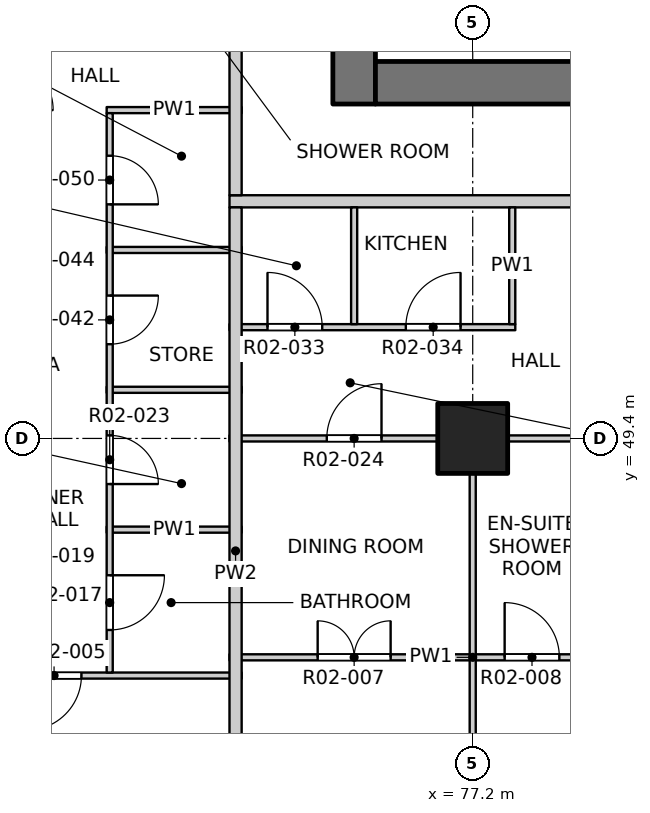
"""IFC4 building model, lengths in metres.
Left out: names, types, materials, properties, quantities, classifications, styles, units other than length and angle.
Written with IfcOpenShell. Run it as: python <this file> out.ifc"""

import sys

from ifc_helpers import new_model, si_unit, direction, frame, frame_2d, origin, origin_2d, place, context, subcontext, project, spatial, rectangle, extrude, element, fill, save


model = new_model("IFC4")
c1 = context("Model", 3, precision=1e-05, world=origin(), true_north=direction((0.0, 1.0)))
c2 = subcontext(c1, "Body", "Model", "MODEL_VIEW")
j1 = project(units=[si_unit("LENGTHUNIT", "METRE"), si_unit("PLANEANGLEUNIT", "RADIAN")], contexts=[c1])
p1 = place(None, origin())
s1 = spatial("IfcSite", under=j1, at=p1, CompositionType="ELEMENT")
p2 = place(p1, origin())
s2 = spatial("IfcBuilding", under=s1, at=p2, CompositionType="ELEMENT")
p3 = place(p2, frame((0.0, 0.0, 36.5)))
s3 = spatial("IfcBuildingStorey", under=s2, at=p3, CompositionType="ELEMENT", Elevation=36.5)
p4 = place(p3, frame((77.2, 49.4, -0.25), z_axis=(0.0, 0.0, 1.0), x_axis=(1.0, 0.0, 0.0)))
e1 = element("IfcColumn", 1, at=p4, inside=s3, PredefinedType="COLUMN", context=c2, shape_type="SweptSolid", body=[
    extrude(rectangle(XDim=1.15, YDim=1.15, at=origin_2d()), origin(), (0.0, 0.0, 1.0), 3.4),
])
p5 = place(p3, frame((75.25, 54.9, -0.25), z_axis=(0.0, 0.0, 1.0), x_axis=(0.0, 1.0, 0.0)))
e2 = element("IfcWall", 2, at=p5, inside=s3, PredefinedType="SOLIDWALL", context=c2, shape_type="SweptSolid", body=[
    extrude(rectangle(XDim=22.4, YDim=0.7, at=frame_2d((11.2, 0.0))), origin(), (0.0, 0.0, 1.0), 3.4),
])
p6 = place(p5, frame((7.55, 0.0, 0.25)))
e3 = element("IfcOpeningElement", 3, at=p6, cuts=e2, PredefinedType="OPENING", context=c2, shape_type="SweptSolid", body=[
    extrude(rectangle(XDim=0.9, YDim=2.1, at=frame_2d((0.45, 1.05))), frame((0.0, 0.36, 0.0), z_axis=(0.0, -1.0, 0.0), x_axis=(1.0, 0.0, 0.0)), (0.0, 0.0, 1.0), 0.72),
])
p7 = place(p5, frame((10.85, 0.0, 0.25)))
e4 = element("IfcOpeningElement", 4, at=p7, cuts=e2, PredefinedType="OPENING", context=c2, shape_type="SweptSolid", body=[
    extrude(rectangle(XDim=0.9, YDim=2.1, at=frame_2d((0.45, 1.05))), frame((0.0, 0.36, 0.0), z_axis=(0.0, -1.0, 0.0), x_axis=(1.0, 0.0, 0.0)), (0.0, 0.0, 1.0), 0.72),
])
p8 = place(p5, frame((13.85, 0.0, 0.25)))
e5 = element("IfcOpeningElement", 5, at=p8, cuts=e2, PredefinedType="OPENING", context=c2, shape_type="SweptSolid", body=[
    extrude(rectangle(XDim=0.9, YDim=2.1, at=frame_2d((0.45, 1.05))), frame((0.0, 0.36, 0.0), z_axis=(0.0, -1.0, 0.0), x_axis=(1.0, 0.0, 0.0)), (0.0, 0.0, 1.0), 0.72),
])
p9 = place(p5, frame((16.85, 0.0, 0.25)))
e6 = element("IfcOpeningElement", 6, at=p9, cuts=e2, PredefinedType="OPENING", context=c2, shape_type="SweptSolid", body=[
    extrude(rectangle(XDim=0.9, YDim=2.1, at=frame_2d((0.45, 1.05))), frame((0.0, 0.36, 0.0), z_axis=(0.0, -1.0, 0.0), x_axis=(1.0, 0.0, 0.0)), (0.0, 0.0, 1.0), 0.72),
])
p10 = place(p5, frame((20.15, 0.0, 0.25)))
e7 = element("IfcOpeningElement", 7, at=p10, cuts=e2, PredefinedType="OPENING", context=c2, shape_type="SweptSolid", body=[
    extrude(rectangle(XDim=0.9, YDim=2.1, at=frame_2d((0.45, 1.05))), frame((0.0, 0.36, 0.0), z_axis=(0.0, -1.0, 0.0), x_axis=(1.0, 0.0, 0.0)), (0.0, 0.0, 1.0), 0.72),
])
p11 = place(p3, frame((75.6, 55.25, -0.25), z_axis=(0.0, 0.0, 1.0), x_axis=(1.0, 0.0, 0.0)))
e8 = element("IfcWall", 8, at=p11, inside=s3, PredefinedType="SOLIDWALL", context=c2, shape_type="SweptSolid", body=[
    extrude(rectangle(XDim=18.8, YDim=0.7, at=frame_2d((9.4, 0.0))), origin(), (0.0, 0.0, 1.0), 3.4),
])
p12 = place(p11, frame((8.65, 0.0, 0.25)))
e9 = element("IfcOpeningElement", 9, at=p12, cuts=e8, PredefinedType="OPENING", context=c2, shape_type="SweptSolid", body=[
    extrude(rectangle(XDim=1.5, YDim=2.1, at=frame_2d((0.75, 1.05))), frame((0.0, 0.36, 0.0), z_axis=(0.0, -1.0, 0.0), x_axis=(1.0, 0.0, 0.0)), (0.0, 0.0, 1.0), 0.72),
])
p13 = place(p3, frame((61.9, 45.5, 0.0), z_axis=(0.0, 0.0, 1.0), x_axis=(1.0, 0.0, 0.0)))
e10 = element("IfcWall", 10, at=p13, inside=s3, PredefinedType="PARTITIONING", context=c2, shape_type="SweptSolid", body=[
    extrude(rectangle(XDim=11.5, YDim=0.1, at=frame_2d((5.75, 0.0))), origin(), (0.0, 0.0, 1.0), 3.15),
])
p14 = place(p13, frame((7.965, 0.0, 0.0)))
e11 = element("IfcOpeningElement", 11, at=p14, cuts=e10, PredefinedType="OPENING", context=c2, shape_type="SweptSolid", body=[
    extrude(rectangle(XDim=0.9, YDim=2.1, at=frame_2d((0.45, 1.05))), frame((0.0, 0.06, 0.0), z_axis=(0.0, -1.0, 0.0), x_axis=(1.0, 0.0, 0.0)), (0.0, 0.0, 1.0), 0.12),
])
p15 = place(p3, frame((73.2, 45.8, 0.0), z_axis=(0.0, 0.0, 1.0), x_axis=(1.0, 0.0, 0.0)))
e12 = element("IfcWall", 12, at=p15, inside=s3, PredefinedType="PARTITIONING", context=c2, shape_type="SweptSolid", body=[
    extrude(rectangle(XDim=8.0, YDim=0.1, at=frame_2d((4.0, 0.0))), origin(), (0.0, 0.0, 1.0), 3.15),
])
p16 = place(p15, frame((1.45, 0.0, 0.0)))
e13 = element("IfcOpeningElement", 13, at=p16, cuts=e12, PredefinedType="OPENING", context=c2, shape_type="SweptSolid", body=[
    extrude(rectangle(XDim=1.2, YDim=2.1, at=frame_2d((0.6, 1.05))), frame((0.0, 0.06, 0.0), z_axis=(0.0, -1.0, 0.0), x_axis=(1.0, 0.0, 0.0)), (0.0, 0.0, 1.0), 0.12),
])
p17 = place(p15, frame((4.525, 0.0, 0.0)))
e14 = element("IfcOpeningElement", 14, at=p17, cuts=e12, PredefinedType="OPENING", context=c2, shape_type="SweptSolid", body=[
    extrude(rectangle(XDim=0.9, YDim=2.1, at=frame_2d((0.45, 1.05))), frame((0.0, 0.06, 0.0), z_axis=(0.0, -1.0, 0.0), x_axis=(1.0, 0.0, 0.0)), (0.0, 0.0, 1.0), 0.12),
])
p18 = place(p15, frame((6.475, 0.0, 0.0)))
e15 = element("IfcOpeningElement", 15, at=p18, cuts=e12, PredefinedType="OPENING", context=c2, shape_type="SweptSolid", body=[
    extrude(rectangle(XDim=0.9, YDim=2.1, at=frame_2d((0.45, 1.05))), frame((0.0, 0.06, 0.0), z_axis=(0.0, -1.0, 0.0), x_axis=(1.0, 0.0, 0.0)), (0.0, 0.0, 1.0), 0.12),
])
p19 = place(p3, frame((71.18, 47.9, 0.0), z_axis=(0.0, 0.0, 1.0), x_axis=(1.0, 0.0, 0.0)))
e16 = element("IfcWall", 16, at=p19, inside=s3, PredefinedType="PARTITIONING", context=c2, shape_type="SweptSolid", body=[
    extrude(rectangle(XDim=2.22, YDim=0.1, at=frame_2d((1.11, 0.0))), origin(), (0.0, 0.0, 1.0), 3.15),
])
p20 = place(p3, frame((73.2, 49.4, 0.0), z_axis=(0.0, 0.0, 1.0), x_axis=(1.0, 0.0, 0.0)))
e17 = element("IfcWall", 17, at=p20, inside=s3, PredefinedType="PARTITIONING", context=c2, shape_type="SweptSolid", body=[
    extrude(rectangle(XDim=23.6, YDim=0.1, at=frame_2d((11.8, 0.0))), origin(), (0.0, 0.0, 1.0), 3.15),
])
p21 = place(p20, frame((1.6, 0.0, 0.0)))
e18 = element("IfcOpeningElement", 18, at=p21, cuts=e17, PredefinedType="OPENING", context=c2, shape_type="SweptSolid", body=[
    extrude(rectangle(XDim=0.9, YDim=2.1, at=frame_2d((0.45, 1.05))), frame((0.0, 0.06, 0.0), z_axis=(0.0, -1.0, 0.0), x_axis=(1.0, 0.0, 0.0)), (0.0, 0.0, 1.0), 0.12),
])
p22 = place(p20, frame((6.475, 0.0, 0.0)))
e19 = element("IfcOpeningElement", 19, at=p22, cuts=e17, PredefinedType="OPENING", context=c2, shape_type="SweptSolid", body=[
    extrude(rectangle(XDim=0.9, YDim=2.1, at=frame_2d((0.45, 1.05))), frame((0.0, 0.06, 0.0), z_axis=(0.0, -1.0, 0.0), x_axis=(1.0, 0.0, 0.0)), (0.0, 0.0, 1.0), 0.12),
])
p23 = place(p20, frame((10.2, 0.0, 0.0)))
e20 = element("IfcOpeningElement", 20, at=p23, cuts=e17, PredefinedType="OPENING", context=c2, shape_type="SweptSolid", body=[
    extrude(rectangle(XDim=0.9, YDim=2.1, at=frame_2d((0.45, 1.05))), frame((0.0, 0.06, 0.0), z_axis=(0.0, -1.0, 0.0), x_axis=(1.0, 0.0, 0.0)), (0.0, 0.0, 1.0), 0.12),
])
p24 = place(p20, frame((13.3, 0.0, 0.0)))
e21 = element("IfcOpeningElement", 21, at=p24, cuts=e17, PredefinedType="OPENING", context=c2, shape_type="SweptSolid", body=[
    extrude(rectangle(XDim=0.9, YDim=2.1, at=frame_2d((0.45, 1.05))), frame((0.0, 0.06, 0.0), z_axis=(0.0, -1.0, 0.0), x_axis=(1.0, 0.0, 0.0)), (0.0, 0.0, 1.0), 0.12),
])
p25 = place(p20, frame((18.0, 0.0, 0.0)))
e22 = element("IfcOpeningElement", 22, at=p25, cuts=e17, PredefinedType="OPENING", context=c2, shape_type="SweptSolid", body=[
    extrude(rectangle(XDim=0.9, YDim=2.1, at=frame_2d((0.45, 1.05))), frame((0.0, 0.06, 0.0), z_axis=(0.0, -1.0, 0.0), x_axis=(1.0, 0.0, 0.0)), (0.0, 0.0, 1.0), 0.12),
])
p26 = place(p20, frame((21.1, 0.0, 0.0)))
e23 = element("IfcOpeningElement", 23, at=p26, cuts=e17, PredefinedType="OPENING", context=c2, shape_type="SweptSolid", body=[
    extrude(rectangle(XDim=0.9, YDim=2.1, at=frame_2d((0.45, 1.05))), frame((0.0, 0.06, 0.0), z_axis=(0.0, -1.0, 0.0), x_axis=(1.0, 0.0, 0.0)), (0.0, 0.0, 1.0), 0.12),
])
p27 = place(p3, frame((71.18, 50.2, 0.0), z_axis=(0.0, 0.0, 1.0), x_axis=(1.0, 0.0, 0.0)))
e24 = element("IfcWall", 24, at=p27, inside=s3, PredefinedType="PARTITIONING", context=c2, shape_type="SweptSolid", body=[
    extrude(rectangle(XDim=2.22, YDim=0.1, at=frame_2d((1.11, 0.0))), origin(), (0.0, 0.0, 1.0), 3.15),
])
p28 = place(p3, frame((73.2, 51.23, 0.0), z_axis=(0.0, 0.0, 1.0), x_axis=(1.0, 0.0, 0.0)))
e25 = element("IfcWall", 25, at=p28, inside=s3, PredefinedType="PARTITIONING", context=c2, shape_type="SweptSolid", body=[
    extrude(rectangle(XDim=4.7, YDim=0.1, at=frame_2d((2.35, 0.0))), origin(), (0.0, 0.0, 1.0), 3.15),
])
p29 = place(p28, frame((0.625, 0.0, 0.0)))
e26 = element("IfcOpeningElement", 26, at=p29, cuts=e25, PredefinedType="OPENING", context=c2, shape_type="SweptSolid", body=[
    extrude(rectangle(XDim=0.9, YDim=2.1, at=frame_2d((0.45, 1.05))), frame((0.0, 0.06, 0.0), z_axis=(0.0, -1.0, 0.0), x_axis=(1.0, 0.0, 0.0)), (0.0, 0.0, 1.0), 0.12),
])
p30 = place(p28, frame((2.9, 0.0, 0.0)))
e27 = element("IfcOpeningElement", 27, at=p30, cuts=e25, PredefinedType="OPENING", context=c2, shape_type="SweptSolid", body=[
    extrude(rectangle(XDim=0.9, YDim=2.1, at=frame_2d((0.45, 1.05))), frame((0.0, 0.06, 0.0), z_axis=(0.0, -1.0, 0.0), x_axis=(1.0, 0.0, 0.0)), (0.0, 0.0, 1.0), 0.12),
])
p31 = place(p3, frame((71.18, 52.5, 0.0), z_axis=(0.0, 0.0, 1.0), x_axis=(1.0, 0.0, 0.0)))
e28 = element("IfcWall", 28, at=p31, inside=s3, PredefinedType="PARTITIONING", context=c2, shape_type="SweptSolid", body=[
    extrude(rectangle(XDim=2.22, YDim=0.1, at=frame_2d((1.11, 0.0))), origin(), (0.0, 0.0, 1.0), 3.15),
])
p32 = place(p3, frame((73.2, 53.3, 0.0), z_axis=(0.0, 0.0, 1.0), x_axis=(1.0, 0.0, 0.0)))
e29 = element("IfcWall", 29, at=p32, inside=s3, PredefinedType="PARTITIONING", context=c2, shape_type="SweptSolid", body=[
    extrude(rectangle(XDim=23.6, YDim=0.2, at=frame_2d((11.8, 0.0))), origin(), (0.0, 0.0, 1.0), 3.15),
])
p33 = place(p32, frame((5.925, 0.0, 0.0)))
e30 = element("IfcOpeningElement", 30, at=p33, cuts=e29, PredefinedType="OPENING", context=c2, shape_type="SweptSolid", body=[
    extrude(rectangle(XDim=1.0, YDim=2.1, at=frame_2d((0.5, 1.05))), frame((0.0, 0.11, 0.0), z_axis=(0.0, -1.0, 0.0), x_axis=(1.0, 0.0, 0.0)), (0.0, 0.0, 1.0), 0.22),
])
p34 = place(p32, frame((17.925, 0.0, 0.0)))
e31 = element("IfcOpeningElement", 31, at=p34, cuts=e29, PredefinedType="OPENING", context=c2, shape_type="SweptSolid", body=[
    extrude(rectangle(XDim=1.0, YDim=2.1, at=frame_2d((0.5, 1.05))), frame((0.0, 0.11, 0.0), z_axis=(0.0, -1.0, 0.0), x_axis=(1.0, 0.0, 0.0)), (0.0, 0.0, 1.0), 0.22),
])
p35 = place(p3, frame((71.18, 54.8, 0.0), z_axis=(0.0, 0.0, 1.0), x_axis=(1.0, 0.0, 0.0)))
e32 = element("IfcWall", 32, at=p35, inside=s3, PredefinedType="PARTITIONING", context=c2, shape_type="SweptSolid", body=[
    extrude(rectangle(XDim=2.22, YDim=0.1, at=frame_2d((1.11, 0.0))), origin(), (0.0, 0.0, 1.0), 3.15),
])
p36 = place(p3, frame((71.23, 45.55, 0.0), z_axis=(0.0, 0.0, 1.0), x_axis=(0.0, 1.0, 0.0)))
e33 = element("IfcWall", 33, at=p36, inside=s3, PredefinedType="PARTITIONING", context=c2, shape_type="SweptSolid", body=[
    extrude(rectangle(XDim=9.2, YDim=0.1, at=frame_2d((4.6, 0.0))), origin(), (0.0, 0.0, 1.0), 3.15),
])
p37 = place(p36, frame((0.7, 0.0, 0.0)))
e34 = element("IfcOpeningElement", 34, at=p37, cuts=e33, PredefinedType="OPENING", context=c2, shape_type="SweptSolid", body=[
    extrude(rectangle(XDim=0.9, YDim=2.1, at=frame_2d((0.45, 1.05))), frame((0.0, 0.06, 0.0), z_axis=(0.0, -1.0, 0.0), x_axis=(1.0, 0.0, 0.0)), (0.0, 0.0, 1.0), 0.12),
])
p38 = place(p36, frame((3.1, 0.0, 0.0)))
e35 = element("IfcOpeningElement", 35, at=p38, cuts=e33, PredefinedType="OPENING", context=c2, shape_type="SweptSolid", body=[
    extrude(rectangle(XDim=0.8, YDim=2.1, at=frame_2d((0.4, 1.05))), frame((0.0, 0.06, 0.0), z_axis=(0.0, -1.0, 0.0), x_axis=(1.0, 0.0, 0.0)), (0.0, 0.0, 1.0), 0.12),
])
p39 = place(p36, frame((5.4, 0.0, 0.0)))
e36 = element("IfcOpeningElement", 36, at=p39, cuts=e33, PredefinedType="OPENING", context=c2, shape_type="SweptSolid", body=[
    extrude(rectangle(XDim=0.8, YDim=2.1, at=frame_2d((0.4, 1.05))), frame((0.0, 0.06, 0.0), z_axis=(0.0, -1.0, 0.0), x_axis=(1.0, 0.0, 0.0)), (0.0, 0.0, 1.0), 0.12),
])
p40 = place(p36, frame((7.7, 0.0, 0.0)))
e37 = element("IfcOpeningElement", 37, at=p40, cuts=e33, PredefinedType="OPENING", context=c2, shape_type="SweptSolid", body=[
    extrude(rectangle(XDim=0.8, YDim=2.1, at=frame_2d((0.4, 1.05))), frame((0.0, 0.06, 0.0), z_axis=(0.0, -1.0, 0.0), x_axis=(1.0, 0.0, 0.0)), (0.0, 0.0, 1.0), 0.12),
])
p41 = place(p3, frame((73.3, 41.9, 0.0), z_axis=(0.0, 0.0, 1.0), x_axis=(0.0, 1.0, 0.0)))
e38 = element("IfcWall", 38, at=p41, inside=s3, PredefinedType="PARTITIONING", context=c2, shape_type="SweptSolid", body=[
    extrude(rectangle(XDim=11.3, YDim=0.2, at=frame_2d((5.65, 0.0))), origin(), (0.0, 0.0, 1.0), 3.15),
])
p42 = place(p3, frame((73.3, 53.4, 0.0), z_axis=(0.0, 0.0, 1.0), x_axis=(0.0, 1.0, 0.0)))
e39 = element("IfcWall", 39, at=p42, inside=s3, PredefinedType="PARTITIONING", context=c2, shape_type="SweptSolid", body=[
    extrude(rectangle(XDim=31.0, YDim=0.2, at=frame_2d((15.5, 0.0))), origin(), (0.0, 0.0, 1.0), 3.15),
])
p43 = place(p42, frame((2.675, 0.0, 0.0)))
e40 = element("IfcOpeningElement", 40, at=p43, cuts=e39, PredefinedType="OPENING", context=c2, shape_type="SweptSolid", body=[
    extrude(rectangle(XDim=1.0, YDim=2.1, at=frame_2d((0.5, 1.05))), frame((0.0, 0.11, 0.0), z_axis=(0.0, -1.0, 0.0), x_axis=(1.0, 0.0, 0.0)), (0.0, 0.0, 1.0), 0.22),
])
p44 = place(p42, frame((18.125, 0.0, 0.0)))
e41 = element("IfcOpeningElement", 41, at=p44, cuts=e39, PredefinedType="OPENING", context=c2, shape_type="SweptSolid", body=[
    extrude(rectangle(XDim=1.0, YDim=2.1, at=frame_2d((0.5, 1.05))), frame((0.0, 0.11, 0.0), z_axis=(0.0, -1.0, 0.0), x_axis=(1.0, 0.0, 0.0)), (0.0, 0.0, 1.0), 0.22),
])
p45 = place(p42, frame((26.025, 0.0, 0.0)))
e42 = element("IfcOpeningElement", 42, at=p45, cuts=e39, PredefinedType="OPENING", context=c2, shape_type="SweptSolid", body=[
    extrude(rectangle(XDim=1.0, YDim=2.1, at=frame_2d((0.5, 1.05))), frame((0.0, 0.11, 0.0), z_axis=(0.0, -1.0, 0.0), x_axis=(1.0, 0.0, 0.0)), (0.0, 0.0, 1.0), 0.22),
])
p46 = place(p3, frame((75.25, 51.28, 0.0), z_axis=(0.0, 0.0, 1.0), x_axis=(0.0, 1.0, 0.0)))
e43 = element("IfcWall", 43, at=p46, inside=s3, PredefinedType="PARTITIONING", context=c2, shape_type="SweptSolid", body=[
    extrude(rectangle(XDim=1.92, YDim=0.1, at=frame_2d((0.96, 0.0))), origin(), (0.0, 0.0, 1.0), 3.15),
])
p47 = place(p3, frame((77.2, 41.9, 0.0), z_axis=(0.0, 0.0, 1.0), x_axis=(0.0, 1.0, 0.0)))
e44 = element("IfcWall", 44, at=p47, inside=s3, PredefinedType="PARTITIONING", context=c2, shape_type="SweptSolid", body=[
    extrude(rectangle(XDim=7.45, YDim=0.1, at=frame_2d((3.725, 0.0))), origin(), (0.0, 0.0, 1.0), 2.55),
])
p48 = place(p3, frame((77.85, 51.28, 0.0), z_axis=(0.0, 0.0, 1.0), x_axis=(0.0, 1.0, 0.0)))
e45 = element("IfcWall", 45, at=p48, inside=s3, PredefinedType="PARTITIONING", context=c2, shape_type="SweptSolid", body=[
    extrude(rectangle(XDim=1.92, YDim=0.1, at=frame_2d((0.96, 0.0))), origin(), (0.0, 0.0, 1.0), 3.15),
])
p49 = place(p14, origin())
e46 = element("IfcDoor", 46, at=p49, inside=s3, OperationType="SINGLE_SWING_RIGHT", PredefinedType="DOOR", context=c2, shape_type="SweptSolid", body=[
    extrude(rectangle(XDim=0.9, YDim=2.1, at=frame_2d((0.45, 1.05))), frame((0.0, 0.025, 0.0), z_axis=(0.0, -1.0, 0.0), x_axis=(1.0, 0.0, 0.0)), (0.0, 0.0, 1.0), 0.05),
])
fill(e11, e46)
p50 = place(p16, origin())
e47 = element("IfcDoor", 47, at=p50, inside=s3, OperationType="DOUBLE_DOOR_SINGLE_SWING", PredefinedType="DOOR", context=c2, shape_type="SweptSolid", body=[
    extrude(rectangle(XDim=1.2, YDim=2.1, at=frame_2d((0.6, 1.05))), frame((0.0, 0.025, 0.0), z_axis=(0.0, -1.0, 0.0), x_axis=(1.0, 0.0, 0.0)), (0.0, 0.0, 1.0), 0.05),
])
fill(e13, e47)
p51 = place(p17, origin())
e48 = element("IfcDoor", 48, at=p51, inside=s3, OperationType="SINGLE_SWING_LEFT", PredefinedType="DOOR", context=c2, shape_type="SweptSolid", body=[
    extrude(rectangle(XDim=0.9, YDim=2.1, at=frame_2d((0.45, 1.05))), frame((0.0, 0.025, 0.0), z_axis=(0.0, -1.0, 0.0), x_axis=(1.0, 0.0, 0.0)), (0.0, 0.0, 1.0), 0.05),
])
fill(e14, e48)
p52 = place(p37, origin())
e49 = element("IfcDoor", 49, at=p52, inside=s3, OperationType="SINGLE_SWING_LEFT", PredefinedType="DOOR", context=c2, shape_type="SweptSolid", body=[
    extrude(rectangle(XDim=0.9, YDim=2.1, at=frame_2d((0.45, 1.05))), frame((0.0, 0.025, 0.0), z_axis=(0.0, -1.0, 0.0), x_axis=(1.0, 0.0, 0.0)), (0.0, 0.0, 1.0), 0.05),
])
fill(e34, e49)
p53 = place(p38, origin())
e50 = element("IfcDoor", 50, at=p53, inside=s3, OperationType="SINGLE_SWING_RIGHT", PredefinedType="DOOR", context=c2, shape_type="SweptSolid", body=[
    extrude(rectangle(XDim=0.8, YDim=2.1, at=frame_2d((0.4, 1.05))), frame((0.0, 0.025, 0.0), z_axis=(0.0, -1.0, 0.0), x_axis=(1.0, 0.0, 0.0)), (0.0, 0.0, 1.0), 0.05),
])
fill(e35, e50)
p54 = place(p21, origin())
e51 = element("IfcDoor", 51, at=p54, inside=s3, OperationType="SINGLE_SWING_RIGHT", PredefinedType="DOOR", context=c2, shape_type="SweptSolid", body=[
    extrude(rectangle(XDim=0.9, YDim=2.1, at=frame_2d((0.45, 1.05))), frame((0.0, 0.025, 0.0), z_axis=(0.0, -1.0, 0.0), x_axis=(1.0, 0.0, 0.0)), (0.0, 0.0, 1.0), 0.05),
])
fill(e18, e51)
p55 = place(p29, origin())
e52 = element("IfcDoor", 52, at=p55, inside=s3, OperationType="SINGLE_SWING_LEFT", PredefinedType="DOOR", context=c2, shape_type="SweptSolid", body=[
    extrude(rectangle(XDim=0.9, YDim=2.1, at=frame_2d((0.45, 1.05))), frame((0.0, 0.025, 0.0), z_axis=(0.0, -1.0, 0.0), x_axis=(1.0, 0.0, 0.0)), (0.0, 0.0, 1.0), 0.05),
])
fill(e26, e52)
p56 = place(p30, origin())
e53 = element("IfcDoor", 53, at=p56, inside=s3, OperationType="SINGLE_SWING_RIGHT", PredefinedType="DOOR", context=c2, shape_type="SweptSolid", body=[
    extrude(rectangle(XDim=0.9, YDim=2.1, at=frame_2d((0.45, 1.05))), frame((0.0, 0.025, 0.0), z_axis=(0.0, -1.0, 0.0), x_axis=(1.0, 0.0, 0.0)), (0.0, 0.0, 1.0), 0.05),
])
fill(e27, e53)
p57 = place(p39, origin())
e54 = element("IfcDoor", 54, at=p57, inside=s3, OperationType="SINGLE_SWING_LEFT", PredefinedType="DOOR", context=c2, shape_type="SweptSolid", body=[
    extrude(rectangle(XDim=0.8, YDim=2.1, at=frame_2d((0.4, 1.05))), frame((0.0, 0.025, 0.0), z_axis=(0.0, -1.0, 0.0), x_axis=(1.0, 0.0, 0.0)), (0.0, 0.0, 1.0), 0.05),
])
fill(e36, e54)
p58 = place(p40, origin())
e55 = element("IfcDoor", 55, at=p58, inside=s3, OperationType="SINGLE_SWING_RIGHT", PredefinedType="DOOR", context=c2, shape_type="SweptSolid", body=[
    extrude(rectangle(XDim=0.8, YDim=2.1, at=frame_2d((0.4, 1.05))), frame((0.0, 0.025, 0.0), z_axis=(0.0, -1.0, 0.0), x_axis=(1.0, 0.0, 0.0)), (0.0, 0.0, 1.0), 0.05),
])
fill(e37, e55)
save(model, sys.argv[1])
